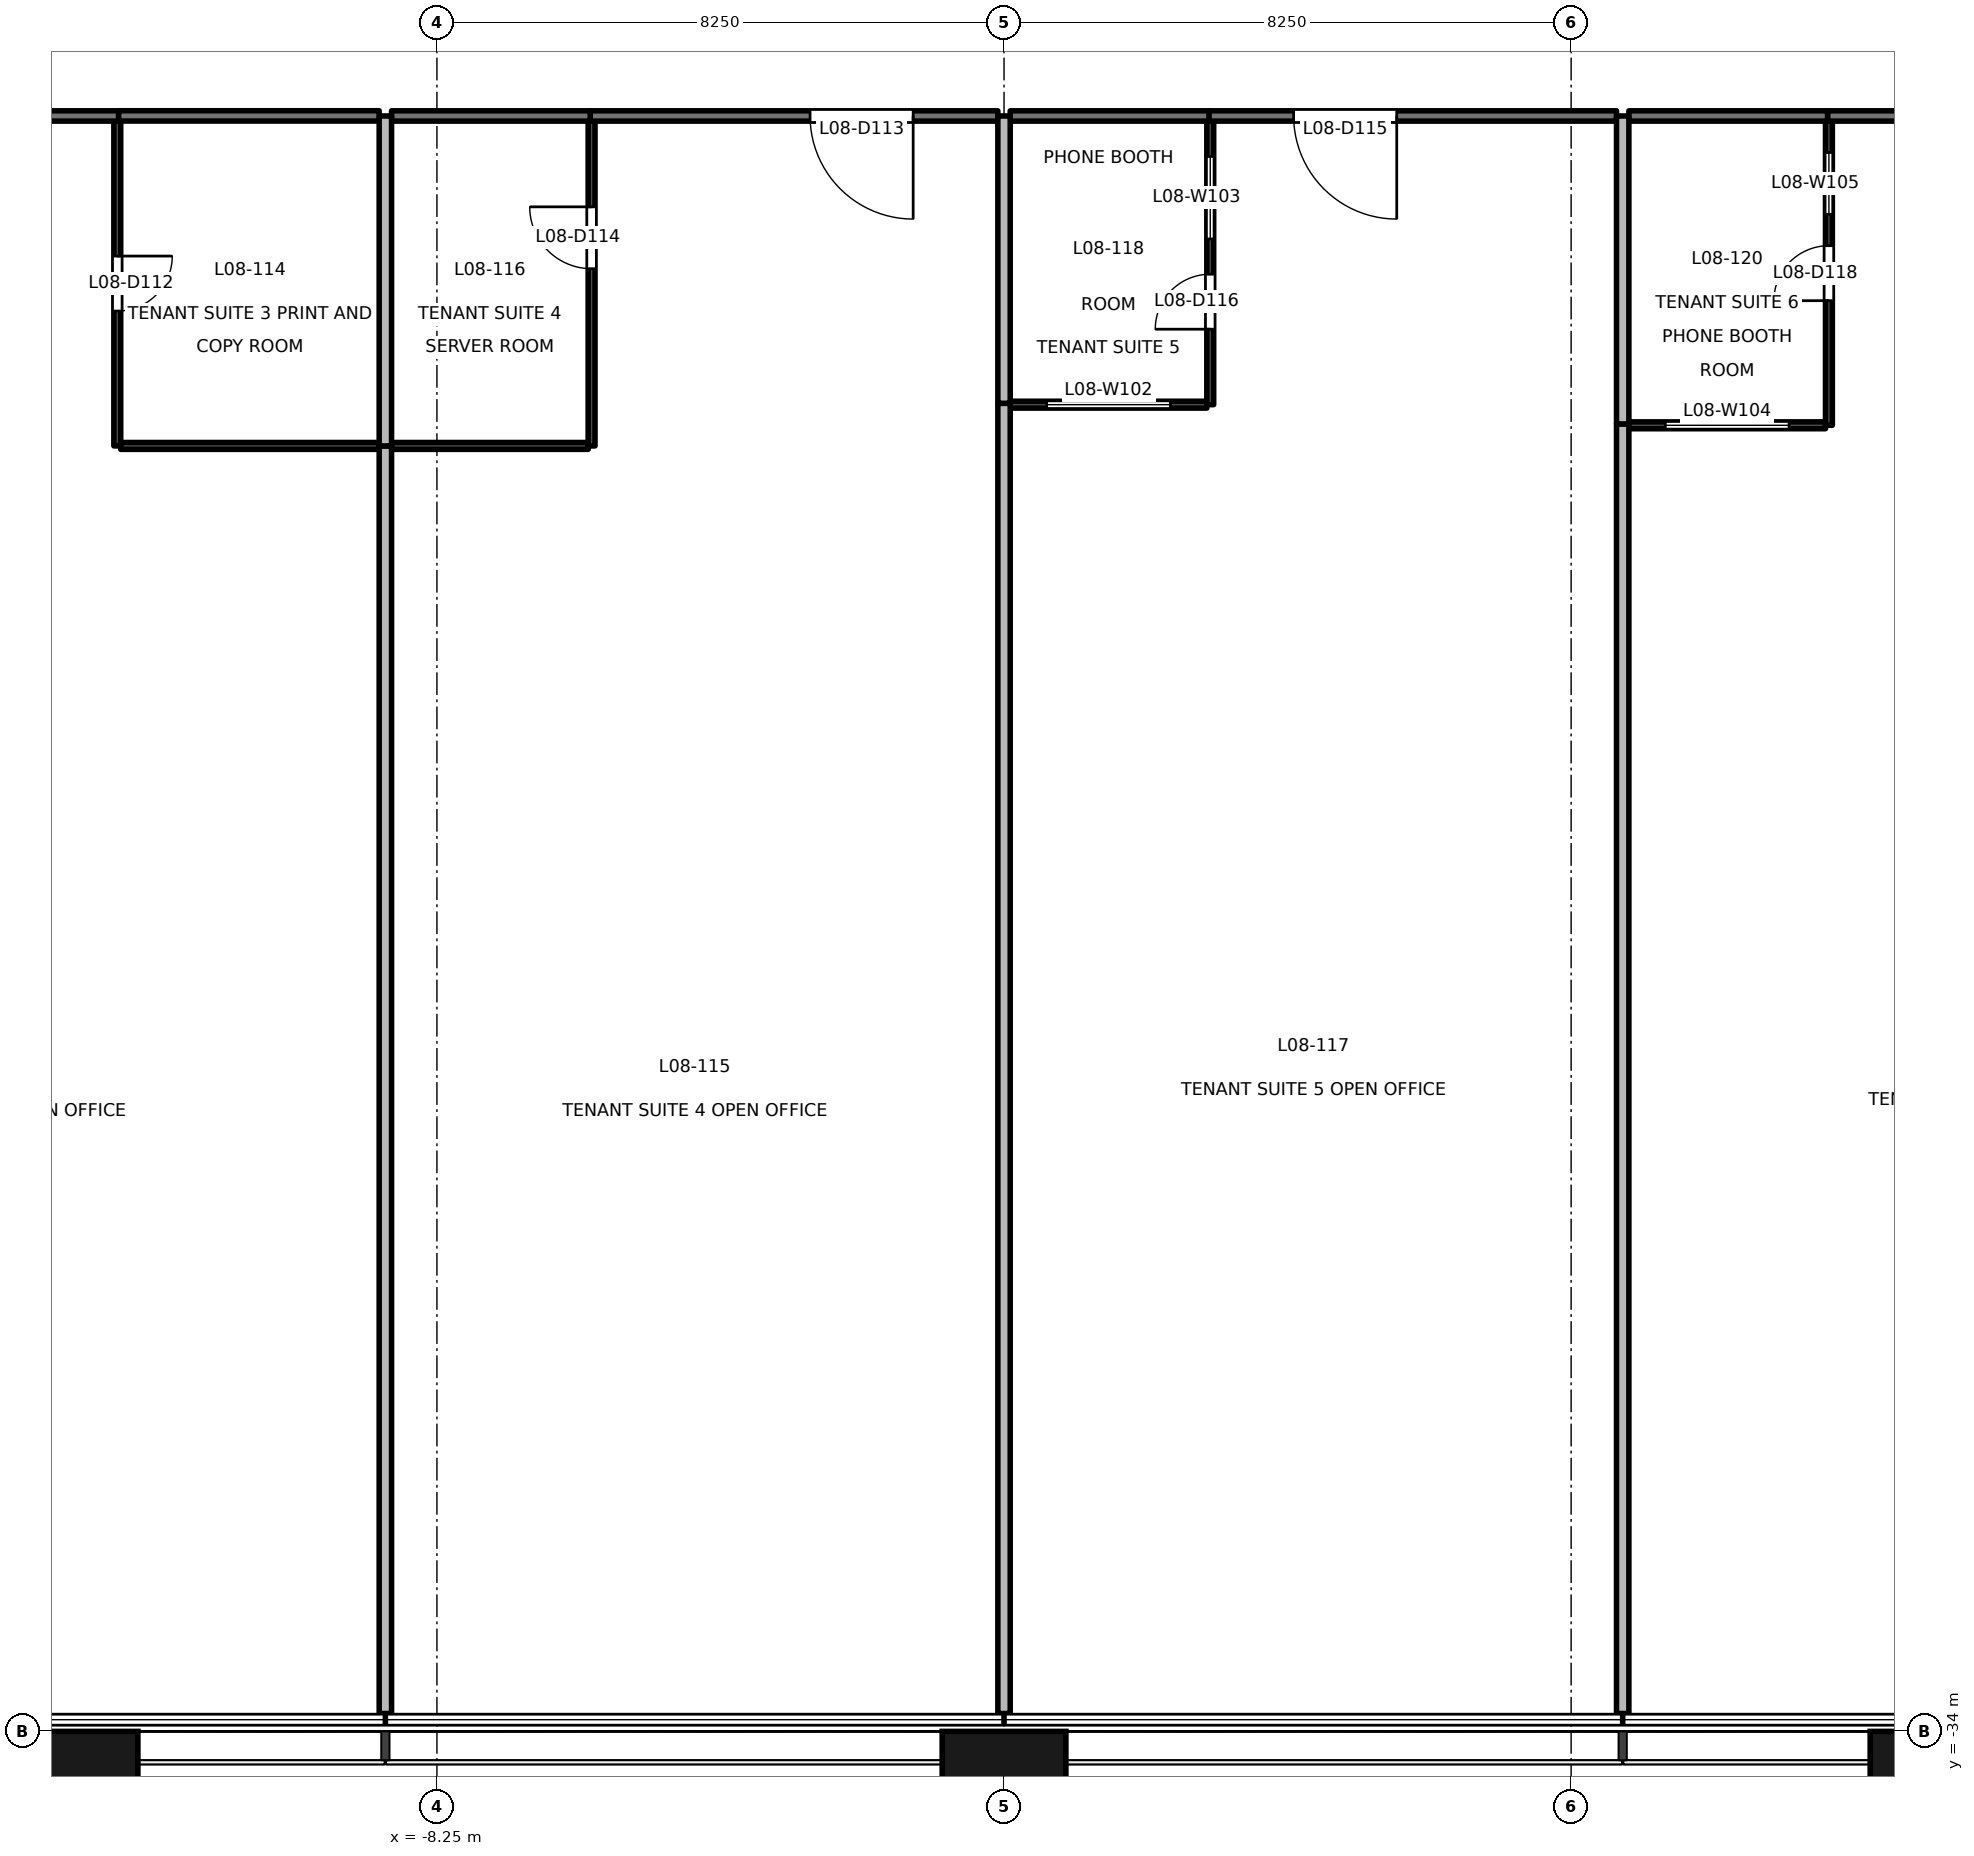
"""IFC4 building model, lengths in metres.
Left out: names, types, materials, properties, quantities, classifications, styles, units other than length and angle.
Written with IfcOpenShell. Run it as: python <this file> out.ifc"""

import sys

from ifc_helpers import new_model, si_unit, direction, frame, frame_2d, origin, origin_2d, place, context, subcontext, project, spatial, rectangle, extrude, element, fill, save


model = new_model("IFC4")
c1 = context("Model", 3, precision=1e-05, world=origin(), true_north=direction((0.0, 1.0)))
c2 = subcontext(c1, "Body", "Model", "MODEL_VIEW")
j1 = project(units=[si_unit("LENGTHUNIT", "METRE"), si_unit("PLANEANGLEUNIT", "RADIAN")], contexts=[c1])
p1 = place(None, origin())
s1 = spatial("IfcSite", under=j1, at=p1, CompositionType="ELEMENT")
p2 = place(p1, origin())
s2 = spatial("IfcBuilding", under=s1, at=p2, CompositionType="ELEMENT")
p3 = place(p2, frame((0.0, 0.0, 40.6)))
s3 = spatial("IfcBuildingStorey", under=s2, at=p3, CompositionType="ELEMENT", Elevation=40.6)
for number, where, z_axis, x_axis in (
    (1, (-13.5, -34.9, -0.2), (0.0, 0.0, 1.0), (1.0, 0.0, 0.0)),
    (2, (0.0, -34.9, -0.2), (0.0, 0.0, 1.0), (1.0, 0.0, 0.0)),
    (3, (13.5, -34.9, -0.2), (0.0, 0.0, 1.0), (1.0, 0.0, 0.0)),
):
    element("IfcColumn", number, at=place(p3, frame(where, z_axis=z_axis, x_axis=x_axis)), inside=s3, PredefinedType="COLUMN", context=c2, shape_type="SweptSolid", body=[
        extrude(rectangle(XDim=1.8, YDim=1.8, at=origin_2d()), origin(), (0.0, 0.0, 1.0), 4.1),
    ])
p4 = place(p3, frame((-12.88, -10.5, 0.0), z_axis=(0.0, 0.0, 1.0), x_axis=(-1.0, 0.0, 0.0)))
e4 = element("IfcWall", 4, at=p4, inside=s3, PredefinedType="PARTITIONING", context=c2, shape_type="SweptSolid", body=[
    extrude(rectangle(XDim=4.54, YDim=0.15, at=frame_2d((2.27, 0.0))), origin(), (0.0, 0.0, 1.0), 2.9),
])
p5 = place(p4, frame((1.93, 0.0, 0.0)))
e5 = element("IfcOpeningElement", 5, at=p5, cuts=e4, PredefinedType="OPENING", context=c2, shape_type="SweptSolid", body=[
    extrude(rectangle(XDim=1.8, YDim=2.1, at=frame_2d((0.9, 1.05))), frame((0.0, 0.085, 0.0), z_axis=(0.0, -1.0, 0.0), x_axis=(1.0, 0.0, 0.0)), (0.0, 0.0, 1.0), 0.171),
])
p6 = place(p3, frame((-9.09, -10.499, 0.0), z_axis=(0.0, 0.0, 1.0), x_axis=(-1.0, 0.0, 0.0)))
e6 = element("IfcWall", 6, at=p6, inside=s3, PredefinedType="PARTITIONING", context=c2, shape_type="SweptSolid", body=[
    extrude(rectangle(XDim=3.79, YDim=0.15, at=frame_2d((1.895, 0.0))), origin(), (0.0, 0.0, 1.0), 2.9),
])
p7 = place(p3, frame((-0.09, -10.5, 0.0), z_axis=(0.0, 0.0, 1.0), x_axis=(-1.0, 0.0, 0.0)))
e7 = element("IfcWall", 7, at=p7, inside=s3, PredefinedType="PARTITIONING", context=c2, shape_type="SweptSolid", body=[
    extrude(rectangle(XDim=5.93, YDim=0.15, at=frame_2d((2.965, 0.0))), origin(), (0.0, 0.0, 1.0), 2.9),
])
p8 = place(p7, frame((1.232, 0.0, 0.0)))
e8 = element("IfcOpeningElement", 8, at=p8, cuts=e7, PredefinedType="OPENING", context=c2, shape_type="SweptSolid", body=[
    extrude(rectangle(XDim=1.5, YDim=2.1, at=frame_2d((0.75, 1.05))), frame((0.0, 0.085, 0.0), z_axis=(0.0, -1.0, 0.0), x_axis=(1.0, 0.0, 0.0)), (0.0, 0.0, 1.0), 0.171),
])
p9 = place(p3, frame((-6.02, -10.5, 0.0), z_axis=(0.0, 0.0, 1.0), x_axis=(-1.0, 0.0, 0.0)))
e9 = element("IfcWall", 9, at=p9, inside=s3, PredefinedType="PARTITIONING", context=c2, shape_type="SweptSolid", body=[
    extrude(rectangle(XDim=2.89, YDim=0.15, at=frame_2d((1.445, 0.0))), origin(), (0.0, 0.0, 1.0), 2.9),
])
p10 = place(p3, frame((8.91, -10.5, 0.0), z_axis=(0.0, 0.0, 1.0), x_axis=(-1.0, 0.0, 0.0)))
e10 = element("IfcWall", 10, at=p10, inside=s3, PredefinedType="PARTITIONING", context=c2, shape_type="SweptSolid", body=[
    extrude(rectangle(XDim=5.93, YDim=0.15, at=frame_2d((2.965, 0.0))), origin(), (0.0, 0.0, 1.0), 2.9),
])
p11 = place(p10, frame((3.197, 0.0, 0.0)))
e11 = element("IfcOpeningElement", 11, at=p11, cuts=e10, PredefinedType="OPENING", context=c2, shape_type="SweptSolid", body=[
    extrude(rectangle(XDim=1.5, YDim=2.1, at=frame_2d((0.75, 1.05))), frame((0.0, 0.085, 0.0), z_axis=(0.0, -1.0, 0.0), x_axis=(1.0, 0.0, 0.0)), (0.0, 0.0, 1.0), 0.171),
])
p12 = place(p3, frame((2.98, -10.5, 0.0), z_axis=(0.0, 0.0, 1.0), x_axis=(-1.0, 0.0, 0.0)))
e12 = element("IfcWall", 12, at=p12, inside=s3, PredefinedType="PARTITIONING", context=c2, shape_type="SweptSolid", body=[
    extrude(rectangle(XDim=2.89, YDim=0.15, at=frame_2d((1.445, 0.0))), origin(), (0.0, 0.0, 1.0), 2.9),
])
p13 = place(p3, frame((15.88, -10.5, 0.0), z_axis=(0.0, 0.0, 1.0), x_axis=(-1.0, 0.0, 0.0)))
e13 = element("IfcWall", 13, at=p13, inside=s3, PredefinedType="PARTITIONING", context=c2, shape_type="SweptSolid", body=[
    extrude(rectangle(XDim=3.9, YDim=0.15, at=frame_2d((1.95, 0.0))), origin(), (0.0, 0.0, 1.0), 2.9),
])
p14 = place(p13, frame((1.05, 0.0, 0.0)))
e14 = element("IfcOpeningElement", 14, at=p14, cuts=e13, PredefinedType="OPENING", context=c2, shape_type="SweptSolid", body=[
    extrude(rectangle(XDim=1.8, YDim=2.1, at=frame_2d((0.9, 1.05))), frame((0.0, 0.085, 0.0), z_axis=(0.0, -1.0, 0.0), x_axis=(1.0, 0.0, 0.0)), (0.0, 0.0, 1.0), 0.171),
])
p15 = place(p3, frame((11.98, -10.5, 0.0), z_axis=(0.0, 0.0, 1.0), x_axis=(-1.0, 0.0, 0.0)))
e15 = element("IfcWall", 15, at=p15, inside=s3, PredefinedType="PARTITIONING", context=c2, shape_type="SweptSolid", body=[
    extrude(rectangle(XDim=2.89, YDim=0.15, at=frame_2d((1.445, 0.0))), origin(), (0.0, 0.0, 1.0), 2.9),
])
p16 = place(p3, frame((-12.9, -10.575, 0.0), z_axis=(0.0, 0.0, 1.0), x_axis=(0.0, -1.0, 0.0)))
e16 = element("IfcWall", 16, at=p16, inside=s3, PredefinedType="PARTITIONING", context=c2, shape_type="SweptSolid", body=[
    extrude(rectangle(XDim=4.725, YDim=0.1, at=frame_2d((2.363, 0.0))), origin(), (0.0, 0.0, 1.0), 3.9),
])
p17 = place(p16, frame((1.963, 0.0, 0.0)))
e17 = element("IfcOpeningElement", 17, at=p17, cuts=e16, PredefinedType="OPENING", context=c2, shape_type="SweptSolid", body=[
    extrude(rectangle(XDim=0.8, YDim=2.1, at=frame_2d((0.4, 1.05))), frame((0.0, 0.061, 0.0), z_axis=(0.0, -1.0, 0.0), x_axis=(1.0, 0.0, 0.0)), (0.0, 0.0, 1.0), 0.121),
])
p18 = place(p3, frame((-12.85, -15.3, 0.0), z_axis=(0.0, 0.0, 1.0), x_axis=(1.0, 0.0, 0.0)))
e18 = element("IfcWall", 18, at=p18, inside=s3, PredefinedType="PARTITIONING", context=c2, shape_type="SweptSolid", body=[
    extrude(rectangle(XDim=3.76, YDim=0.1, at=frame_2d((1.88, 0.0))), origin(), (0.0, 0.0, 1.0), 2.9),
])
p19 = place(p3, frame((-9.0, -15.3, 0.0), z_axis=(0.0, 0.0, 1.0), x_axis=(0.0, -1.0, 0.0)))
e19 = element("IfcWall", 19, at=p19, inside=s3, PredefinedType="PARTITIONING", context=c2, shape_type="SweptSolid", body=[
    extrude(rectangle(XDim=18.44, YDim=0.18, at=frame_2d((9.22, 0.0))), origin(), (0.0, 0.0, 1.0), 2.9),
])
p20 = place(p3, frame((-9.0, -10.5, 0.0), z_axis=(0.0, 0.0, 1.0), x_axis=(0.0, -1.0, 0.0)))
e20 = element("IfcWall", 20, at=p20, inside=s3, PredefinedType="PARTITIONING", context=c2, shape_type="SweptSolid", body=[
    extrude(rectangle(XDim=4.8, YDim=0.18, at=frame_2d((2.4, 0.0))), origin(), (0.0, 0.0, 1.0), 2.9),
])
p21 = place(p3, frame((-8.91, -15.3, 0.0), z_axis=(0.0, 0.0, 1.0), x_axis=(1.0, 0.0, 0.0)))
e21 = element("IfcWall", 21, at=p21, inside=s3, PredefinedType="PARTITIONING", context=c2, shape_type="SweptSolid", body=[
    extrude(rectangle(XDim=2.86, YDim=0.1, at=frame_2d((1.43, 0.0))), origin(), (0.0, 0.0, 1.0), 2.9),
])
p22 = place(p3, frame((-6.0, -15.3, 0.0), z_axis=(0.0, 0.0, 1.0), x_axis=(0.0, 1.0, 0.0)))
e22 = element("IfcWall", 22, at=p22, inside=s3, PredefinedType="PARTITIONING", context=c2, shape_type="SweptSolid", body=[
    extrude(rectangle(XDim=4.725, YDim=0.1, at=frame_2d((2.363, 0.0))), origin(), (0.0, 0.0, 1.0), 3.9),
])
p23 = place(p22, frame((2.578, 0.0, 0.0)))
e23 = element("IfcOpeningElement", 23, at=p23, cuts=e22, PredefinedType="OPENING", context=c2, shape_type="SweptSolid", body=[
    extrude(rectangle(XDim=0.9, YDim=2.1, at=frame_2d((0.45, 1.05))), frame((0.0, 0.061, 0.0), z_axis=(0.0, -1.0, 0.0), x_axis=(1.0, 0.0, 0.0)), (0.0, 0.0, 1.0), 0.121),
])
p24 = place(p3, frame((0.0, -14.68, 0.0), z_axis=(0.0, 0.0, 1.0), x_axis=(0.0, -1.0, 0.0)))
e24 = element("IfcWall", 24, at=p24, inside=s3, PredefinedType="PARTITIONING", context=c2, shape_type="SweptSolid", body=[
    extrude(rectangle(XDim=19.06, YDim=0.18, at=frame_2d((9.53, 0.0))), origin(), (0.0, 0.0, 1.0), 2.9),
])
p25 = place(p3, frame((0.0, -10.5, 0.0), z_axis=(0.0, 0.0, 1.0), x_axis=(0.0, -1.0, 0.0)))
e25 = element("IfcWall", 25, at=p25, inside=s3, PredefinedType="PARTITIONING", context=c2, shape_type="SweptSolid", body=[
    extrude(rectangle(XDim=4.18, YDim=0.18, at=frame_2d((2.09, 0.0))), origin(), (0.0, 0.0, 1.0), 2.9),
])
p26 = place(p3, frame((0.09, -14.7, 0.0), z_axis=(0.0, 0.0, 1.0), x_axis=(1.0, 0.0, 0.0)))
e26 = element("IfcWall", 26, at=p26, inside=s3, PredefinedType="PARTITIONING", context=c2, shape_type="SweptSolid", body=[
    extrude(rectangle(XDim=2.86, YDim=0.1, at=frame_2d((1.43, 0.0))), origin(), (0.0, 0.0, 1.0), 2.9),
])
p27 = place(p26, frame((0.53, 0.0, 0.9)))
e27 = element("IfcOpeningElement", 27, at=p27, cuts=e26, PredefinedType="OPENING", context=c2, shape_type="SweptSolid", body=[
    extrude(rectangle(XDim=1.8, YDim=1.2, at=frame_2d((0.9, 0.6))), frame((0.0, 0.061, 0.0), z_axis=(0.0, -1.0, 0.0), x_axis=(1.0, 0.0, 0.0)), (0.0, 0.0, 1.0), 0.121),
])
p28 = place(p3, frame((3.0, -14.7, 0.0), z_axis=(0.0, 0.0, 1.0), x_axis=(0.0, 1.0, 0.0)))
e28 = element("IfcWall", 28, at=p28, inside=s3, PredefinedType="PARTITIONING", context=c2, shape_type="SweptSolid", body=[
    extrude(rectangle(XDim=4.125, YDim=0.1, at=frame_2d((2.062, 0.0))), origin(), (0.0, 0.0, 1.0), 3.9),
])
p29 = place(p28, frame((1.098, 0.0, 0.0)))
e29 = element("IfcOpeningElement", 29, at=p29, cuts=e28, PredefinedType="OPENING", context=c2, shape_type="SweptSolid", body=[
    extrude(rectangle(XDim=0.8, YDim=2.1, at=frame_2d((0.4, 1.05))), frame((0.0, 0.061, 0.0), z_axis=(0.0, -1.0, 0.0), x_axis=(1.0, 0.0, 0.0)), (0.0, 0.0, 1.0), 0.121),
])
p30 = place(p28, frame((2.411, 0.0, 0.9)))
e30 = element("IfcOpeningElement", 30, at=p30, cuts=e28, PredefinedType="OPENING", context=c2, shape_type="SweptSolid", body=[
    extrude(rectangle(XDim=1.2, YDim=1.2, at=frame_2d((0.6, 0.6))), frame((0.0, 0.061, 0.0), z_axis=(0.0, -1.0, 0.0), x_axis=(1.0, 0.0, 0.0)), (0.0, 0.0, 1.0), 0.121),
])
p31 = place(p3, frame((9.0, -14.98, 0.0), z_axis=(0.0, 0.0, 1.0), x_axis=(0.0, -1.0, 0.0)))
e31 = element("IfcWall", 31, at=p31, inside=s3, PredefinedType="PARTITIONING", context=c2, shape_type="SweptSolid", body=[
    extrude(rectangle(XDim=18.76, YDim=0.18, at=frame_2d((9.38, 0.0))), origin(), (0.0, 0.0, 1.0), 2.9),
])
p32 = place(p3, frame((9.0, -10.5, 0.0), z_axis=(0.0, 0.0, 1.0), x_axis=(0.0, -1.0, 0.0)))
e32 = element("IfcWall", 32, at=p32, inside=s3, PredefinedType="PARTITIONING", context=c2, shape_type="SweptSolid", body=[
    extrude(rectangle(XDim=4.48, YDim=0.18, at=frame_2d((2.24, 0.0))), origin(), (0.0, 0.0, 1.0), 2.9),
])
p33 = place(p3, frame((9.09, -15.0, 0.0), z_axis=(0.0, 0.0, 1.0), x_axis=(1.0, 0.0, 0.0)))
e33 = element("IfcWall", 33, at=p33, inside=s3, PredefinedType="PARTITIONING", context=c2, shape_type="SweptSolid", body=[
    extrude(rectangle(XDim=2.86, YDim=0.1, at=frame_2d((1.43, 0.0))), origin(), (0.0, 0.0, 1.0), 2.9),
])
p34 = place(p33, frame((0.53, 0.0, 0.9)))
e34 = element("IfcOpeningElement", 34, at=p34, cuts=e33, PredefinedType="OPENING", context=c2, shape_type="SweptSolid", body=[
    extrude(rectangle(XDim=1.8, YDim=1.2, at=frame_2d((0.9, 0.6))), frame((0.0, 0.061, 0.0), z_axis=(0.0, -1.0, 0.0), x_axis=(1.0, 0.0, 0.0)), (0.0, 0.0, 1.0), 0.121),
])
p35 = place(p3, frame((12.0, -15.0, 0.0), z_axis=(0.0, 0.0, 1.0), x_axis=(0.0, 1.0, 0.0)))
e35 = element("IfcWall", 35, at=p35, inside=s3, PredefinedType="PARTITIONING", context=c2, shape_type="SweptSolid", body=[
    extrude(rectangle(XDim=4.425, YDim=0.1, at=frame_2d((2.212, 0.0))), origin(), (0.0, 0.0, 1.0), 3.9),
])
p36 = place(p35, frame((1.813, 0.0, 0.0)))
e36 = element("IfcOpeningElement", 36, at=p36, cuts=e35, PredefinedType="OPENING", context=c2, shape_type="SweptSolid", body=[
    extrude(rectangle(XDim=0.8, YDim=2.1, at=frame_2d((0.4, 1.05))), frame((0.0, 0.061, 0.0), z_axis=(0.0, -1.0, 0.0), x_axis=(1.0, 0.0, 0.0)), (0.0, 0.0, 1.0), 0.121),
])
p37 = place(p35, frame((3.069, 0.0, 0.9)))
e37 = element("IfcOpeningElement", 37, at=p37, cuts=e35, PredefinedType="OPENING", context=c2, shape_type="SweptSolid", body=[
    extrude(rectangle(XDim=0.9, YDim=1.2, at=frame_2d((0.45, 0.6))), frame((0.0, 0.061, 0.0), z_axis=(0.0, -1.0, 0.0), x_axis=(1.0, 0.0, 0.0)), (0.0, 0.0, 1.0), 0.121),
])
p38 = place(p17, origin())
e38 = element("IfcDoor", 38, at=p38, inside=s3, OperationType="SINGLE_SWING_LEFT", PredefinedType="DOOR", context=c2, shape_type="SweptSolid", body=[
    extrude(rectangle(XDim=0.8, YDim=2.1, at=frame_2d((0.4, 1.05))), frame((0.0, 0.025, 0.0), z_axis=(0.0, -1.0, 0.0), x_axis=(1.0, 0.0, 0.0)), (0.0, 0.0, 1.0), 0.05),
])
fill(e17, e38)
p39 = place(p8, origin())
e39 = element("IfcDoor", 39, at=p39, inside=s3, OperationType="DOUBLE_DOOR_SINGLE_SWING", PredefinedType="DOOR", context=c2, shape_type="SweptSolid", body=[
    extrude(rectangle(XDim=1.5, YDim=2.1, at=frame_2d((0.75, 1.05))), frame((0.0, 0.025, 0.0), z_axis=(0.0, -1.0, 0.0), x_axis=(1.0, 0.0, 0.0)), (0.0, 0.0, 1.0), 0.05),
])
fill(e8, e39)
p40 = place(p23, origin())
e40 = element("IfcDoor", 40, at=p40, inside=s3, OperationType="SINGLE_SWING_RIGHT", PredefinedType="DOOR", context=c2, shape_type="SweptSolid", body=[
    extrude(rectangle(XDim=0.9, YDim=2.1, at=frame_2d((0.45, 1.05))), frame((0.0, 0.025, 0.0), z_axis=(0.0, -1.0, 0.0), x_axis=(1.0, 0.0, 0.0)), (0.0, 0.0, 1.0), 0.05),
])
fill(e23, e40)
p41 = place(p11, origin())
e41 = element("IfcDoor", 41, at=p41, inside=s3, OperationType="DOUBLE_DOOR_SINGLE_SWING", PredefinedType="DOOR", context=c2, shape_type="SweptSolid", body=[
    extrude(rectangle(XDim=1.5, YDim=2.1, at=frame_2d((0.75, 1.05))), frame((0.0, 0.025, 0.0), z_axis=(0.0, -1.0, 0.0), x_axis=(1.0, 0.0, 0.0)), (0.0, 0.0, 1.0), 0.05),
])
fill(e11, e41)
p42 = place(p29, origin())
e42 = element("IfcDoor", 42, at=p42, inside=s3, OperationType="SINGLE_SWING_LEFT", PredefinedType="DOOR", context=c2, shape_type="SweptSolid", body=[
    extrude(rectangle(XDim=0.8, YDim=2.1, at=frame_2d((0.4, 1.05))), frame((0.0, 0.025, 0.0), z_axis=(0.0, -1.0, 0.0), x_axis=(1.0, 0.0, 0.0)), (0.0, 0.0, 1.0), 0.05),
])
fill(e29, e42)
p43 = place(p36, origin())
e43 = element("IfcDoor", 43, at=p43, inside=s3, OperationType="SINGLE_SWING_LEFT", PredefinedType="DOOR", context=c2, shape_type="SweptSolid", body=[
    extrude(rectangle(XDim=0.8, YDim=2.1, at=frame_2d((0.4, 1.05))), frame((0.0, 0.025, 0.0), z_axis=(0.0, -1.0, 0.0), x_axis=(1.0, 0.0, 0.0)), (0.0, 0.0, 1.0), 0.05),
])
fill(e36, e43)
p44 = place(p27, origin())
e44 = element("IfcWindow", 44, at=p44, inside=s3, PartitioningType="SINGLE_PANEL", PredefinedType="WINDOW", context=c2, shape_type="SweptSolid", body=[
    extrude(rectangle(XDim=1.8, YDim=1.2, at=frame_2d((0.9, 0.6))), frame((0.0, 0.03, 0.0), z_axis=(0.0, -1.0, 0.0), x_axis=(1.0, 0.0, 0.0)), (0.0, 0.0, 1.0), 0.06),
])
fill(e27, e44)
p45 = place(p30, origin())
e45 = element("IfcWindow", 45, at=p45, inside=s3, PartitioningType="SINGLE_PANEL", PredefinedType="WINDOW", context=c2, shape_type="SweptSolid", body=[
    extrude(rectangle(XDim=1.2, YDim=1.2, at=frame_2d((0.6, 0.6))), frame((0.0, 0.03, 0.0), z_axis=(0.0, -1.0, 0.0), x_axis=(1.0, 0.0, 0.0)), (0.0, 0.0, 1.0), 0.06),
])
fill(e30, e45)
p46 = place(p34, origin())
e46 = element("IfcWindow", 46, at=p46, inside=s3, PartitioningType="SINGLE_PANEL", PredefinedType="WINDOW", context=c2, shape_type="SweptSolid", body=[
    extrude(rectangle(XDim=1.8, YDim=1.2, at=frame_2d((0.9, 0.6))), frame((0.0, 0.03, 0.0), z_axis=(0.0, -1.0, 0.0), x_axis=(1.0, 0.0, 0.0)), (0.0, 0.0, 1.0), 0.06),
])
fill(e34, e46)
p47 = place(p37, origin())
e47 = element("IfcWindow", 47, at=p47, inside=s3, PartitioningType="SINGLE_PANEL", PredefinedType="WINDOW", context=c2, shape_type="SweptSolid", body=[
    extrude(rectangle(XDim=0.9, YDim=1.2, at=frame_2d((0.45, 0.6))), frame((0.0, 0.03, 0.0), z_axis=(0.0, -1.0, 0.0), x_axis=(1.0, 0.0, 0.0)), (0.0, 0.0, 1.0), 0.06),
])
fill(e37, e47)
save(model, sys.argv[1])
